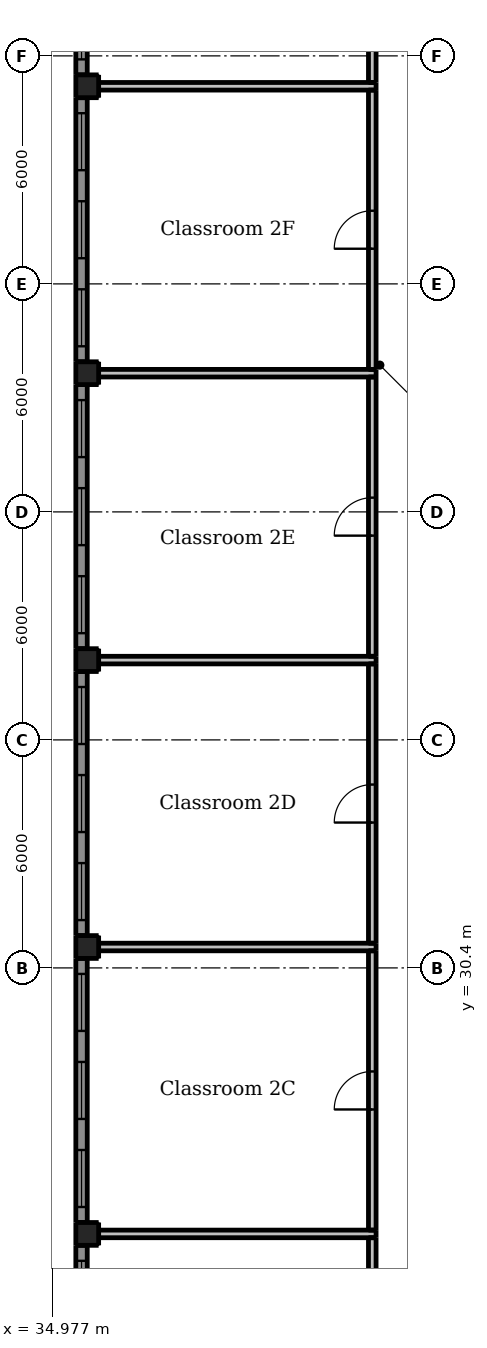
"""IFC4 building model, lengths in metres.
Left out: names, types, materials, properties, quantities, classifications, styles, units other than length and angle.
Written with IfcOpenShell. Run it as: python <this file> out.ifc"""

import sys

from ifc_helpers import new_model, si_unit, direction, frame, frame_2d, origin, origin_2d, place, context, subcontext, project, spatial, rectangle, extrude, element, fill, save


model = new_model("IFC4")
c1 = context("Model", 3, precision=1e-05, world=origin(), true_north=direction((0.0, 1.0)))
c2 = subcontext(c1, "Body", "Model", "MODEL_VIEW")
j1 = project(units=[si_unit("LENGTHUNIT", "METRE"), si_unit("PLANEANGLEUNIT", "RADIAN")], contexts=[c1])
p1 = place(None, origin())
s1 = spatial("IfcSite", under=j1, at=p1, CompositionType="ELEMENT")
p2 = place(p1, origin())
s2 = spatial("IfcBuilding", under=s1, at=p2, CompositionType="ELEMENT")
p3 = place(p2, frame((0.0, 0.0, 10.0)))
s3 = spatial("IfcBuildingStorey", under=s2, at=p3, CompositionType="ELEMENT", Elevation=10.0)
for number, where, z_axis, x_axis in (
    (1, (35.9, 23.4, -0.3), (0.0, 0.0, 1.0), (1.0, 0.0, 0.0)),
    (2, (35.9, 30.95, -0.3), (0.0, 0.0, 1.0), (1.0, 0.0, 0.0)),
    (3, (35.9, 38.5, -0.3), (0.0, 0.0, 1.0), (1.0, 0.0, 0.0)),
    (4, (35.9, 46.05, -0.3), (0.0, 0.0, 1.0), (1.0, 0.0, 0.0)),
    (5, (35.9, 53.6, -0.3), (0.0, 0.0, 1.0), (1.0, 0.0, 0.0)),
):
    element("IfcColumn", number, at=place(p3, frame(where, z_axis=z_axis, x_axis=x_axis)), inside=s3, PredefinedType="COLUMN", context=c2, shape_type="SweptSolid", body=[
        extrude(rectangle(XDim=0.6, YDim=0.6, at=origin_2d()), origin(), (0.0, 0.0, 1.0), 4.5),
    ])
p4 = place(p3, frame((35.75, 16.15, 0.0), z_axis=(0.0, 0.0, 1.0), x_axis=(0.0, 1.0, 0.0)))
e6 = element("IfcWall", 6, at=p4, inside=s3, PredefinedType="SOLIDWALL", context=c2, shape_type="SweptSolid", body=[
    extrude(rectangle(XDim=6.95, YDim=0.3, at=frame_2d((3.475, 0.0))), origin(), (0.0, 0.0, 1.0), 3.3),
])
p5 = place(p4, frame((0.408, 0.0, 0.9)))
e7 = element("IfcOpeningElement", 7, at=p5, cuts=e6, PredefinedType="OPENING", context=c2, shape_type="SweptSolid", body=[
    extrude(rectangle(XDim=1.5, YDim=1.5, at=frame_2d((0.75, 0.75))), frame((0.0, 0.16, 0.0), z_axis=(0.0, -1.0, 0.0), x_axis=(1.0, 0.0, 0.0)), (0.0, 0.0, 1.0), 0.32),
])
p6 = place(p4, frame((2.725, 0.0, 0.9)))
e8 = element("IfcOpeningElement", 8, at=p6, cuts=e6, PredefinedType="OPENING", context=c2, shape_type="SweptSolid", body=[
    extrude(rectangle(XDim=1.5, YDim=1.5, at=frame_2d((0.75, 0.75))), frame((0.0, 0.16, 0.0), z_axis=(0.0, -1.0, 0.0), x_axis=(1.0, 0.0, 0.0)), (0.0, 0.0, 1.0), 0.32),
])
p7 = place(p4, frame((5.042, 0.0, 0.9)))
e9 = element("IfcOpeningElement", 9, at=p7, cuts=e6, PredefinedType="OPENING", context=c2, shape_type="SweptSolid", body=[
    extrude(rectangle(XDim=1.5, YDim=1.5, at=frame_2d((0.75, 0.75))), frame((0.0, 0.16, 0.0), z_axis=(0.0, -1.0, 0.0), x_axis=(1.0, 0.0, 0.0)), (0.0, 0.0, 1.0), 0.32),
])
p8 = place(p3, frame((35.75, 23.7, 0.0), z_axis=(0.0, 0.0, 1.0), x_axis=(0.0, 1.0, 0.0)))
e10 = element("IfcWall", 10, at=p8, inside=s3, PredefinedType="SOLIDWALL", context=c2, shape_type="SweptSolid", body=[
    extrude(rectangle(XDim=6.95, YDim=0.3, at=frame_2d((3.475, 0.0))), origin(), (0.0, 0.0, 1.0), 3.3),
])
p9 = place(p8, frame((0.408, 0.0, 0.9)))
e11 = element("IfcOpeningElement", 11, at=p9, cuts=e10, PredefinedType="OPENING", context=c2, shape_type="SweptSolid", body=[
    extrude(rectangle(XDim=1.5, YDim=1.5, at=frame_2d((0.75, 0.75))), frame((0.0, 0.16, 0.0), z_axis=(0.0, -1.0, 0.0), x_axis=(1.0, 0.0, 0.0)), (0.0, 0.0, 1.0), 0.32),
])
p10 = place(p8, frame((2.725, 0.0, 0.9)))
e12 = element("IfcOpeningElement", 12, at=p10, cuts=e10, PredefinedType="OPENING", context=c2, shape_type="SweptSolid", body=[
    extrude(rectangle(XDim=1.5, YDim=1.5, at=frame_2d((0.75, 0.75))), frame((0.0, 0.16, 0.0), z_axis=(0.0, -1.0, 0.0), x_axis=(1.0, 0.0, 0.0)), (0.0, 0.0, 1.0), 0.32),
])
p11 = place(p8, frame((5.042, 0.0, 0.9)))
e13 = element("IfcOpeningElement", 13, at=p11, cuts=e10, PredefinedType="OPENING", context=c2, shape_type="SweptSolid", body=[
    extrude(rectangle(XDim=1.5, YDim=1.5, at=frame_2d((0.75, 0.75))), frame((0.0, 0.16, 0.0), z_axis=(0.0, -1.0, 0.0), x_axis=(1.0, 0.0, 0.0)), (0.0, 0.0, 1.0), 0.32),
])
p12 = place(p3, frame((35.75, 31.25, 0.0), z_axis=(0.0, 0.0, 1.0), x_axis=(0.0, 1.0, 0.0)))
e14 = element("IfcWall", 14, at=p12, inside=s3, PredefinedType="SOLIDWALL", context=c2, shape_type="SweptSolid", body=[
    extrude(rectangle(XDim=6.95, YDim=0.3, at=frame_2d((3.475, 0.0))), origin(), (0.0, 0.0, 1.0), 3.3),
])
p13 = place(p12, frame((0.408, 0.0, 0.9)))
e15 = element("IfcOpeningElement", 15, at=p13, cuts=e14, PredefinedType="OPENING", context=c2, shape_type="SweptSolid", body=[
    extrude(rectangle(XDim=1.5, YDim=1.5, at=frame_2d((0.75, 0.75))), frame((0.0, 0.16, 0.0), z_axis=(0.0, -1.0, 0.0), x_axis=(1.0, 0.0, 0.0)), (0.0, 0.0, 1.0), 0.32),
])
p14 = place(p12, frame((2.725, 0.0, 0.9)))
e16 = element("IfcOpeningElement", 16, at=p14, cuts=e14, PredefinedType="OPENING", context=c2, shape_type="SweptSolid", body=[
    extrude(rectangle(XDim=1.5, YDim=1.5, at=frame_2d((0.75, 0.75))), frame((0.0, 0.16, 0.0), z_axis=(0.0, -1.0, 0.0), x_axis=(1.0, 0.0, 0.0)), (0.0, 0.0, 1.0), 0.32),
])
p15 = place(p12, frame((5.042, 0.0, 0.9)))
e17 = element("IfcOpeningElement", 17, at=p15, cuts=e14, PredefinedType="OPENING", context=c2, shape_type="SweptSolid", body=[
    extrude(rectangle(XDim=1.5, YDim=1.5, at=frame_2d((0.75, 0.75))), frame((0.0, 0.16, 0.0), z_axis=(0.0, -1.0, 0.0), x_axis=(1.0, 0.0, 0.0)), (0.0, 0.0, 1.0), 0.32),
])
p16 = place(p3, frame((35.75, 38.8, 0.0), z_axis=(0.0, 0.0, 1.0), x_axis=(0.0, 1.0, 0.0)))
e18 = element("IfcWall", 18, at=p16, inside=s3, PredefinedType="SOLIDWALL", context=c2, shape_type="SweptSolid", body=[
    extrude(rectangle(XDim=6.95, YDim=0.3, at=frame_2d((3.475, 0.0))), origin(), (0.0, 0.0, 1.0), 3.3),
])
p17 = place(p16, frame((0.408, 0.0, 0.9)))
e19 = element("IfcOpeningElement", 19, at=p17, cuts=e18, PredefinedType="OPENING", context=c2, shape_type="SweptSolid", body=[
    extrude(rectangle(XDim=1.5, YDim=1.5, at=frame_2d((0.75, 0.75))), frame((0.0, 0.16, 0.0), z_axis=(0.0, -1.0, 0.0), x_axis=(1.0, 0.0, 0.0)), (0.0, 0.0, 1.0), 0.32),
])
p18 = place(p16, frame((2.725, 0.0, 0.9)))
e20 = element("IfcOpeningElement", 20, at=p18, cuts=e18, PredefinedType="OPENING", context=c2, shape_type="SweptSolid", body=[
    extrude(rectangle(XDim=1.5, YDim=1.5, at=frame_2d((0.75, 0.75))), frame((0.0, 0.16, 0.0), z_axis=(0.0, -1.0, 0.0), x_axis=(1.0, 0.0, 0.0)), (0.0, 0.0, 1.0), 0.32),
])
p19 = place(p16, frame((5.042, 0.0, 0.9)))
e21 = element("IfcOpeningElement", 21, at=p19, cuts=e18, PredefinedType="OPENING", context=c2, shape_type="SweptSolid", body=[
    extrude(rectangle(XDim=1.5, YDim=1.5, at=frame_2d((0.75, 0.75))), frame((0.0, 0.16, 0.0), z_axis=(0.0, -1.0, 0.0), x_axis=(1.0, 0.0, 0.0)), (0.0, 0.0, 1.0), 0.32),
])
p20 = place(p3, frame((35.75, 46.35, 0.0), z_axis=(0.0, 0.0, 1.0), x_axis=(0.0, 1.0, 0.0)))
e22 = element("IfcWall", 22, at=p20, inside=s3, PredefinedType="SOLIDWALL", context=c2, shape_type="SweptSolid", body=[
    extrude(rectangle(XDim=6.95, YDim=0.3, at=frame_2d((3.475, 0.0))), origin(), (0.0, 0.0, 1.0), 3.3),
])
p21 = place(p20, frame((0.408, 0.0, 0.9)))
e23 = element("IfcOpeningElement", 23, at=p21, cuts=e22, PredefinedType="OPENING", context=c2, shape_type="SweptSolid", body=[
    extrude(rectangle(XDim=1.5, YDim=1.5, at=frame_2d((0.75, 0.75))), frame((0.0, 0.16, 0.0), z_axis=(0.0, -1.0, 0.0), x_axis=(1.0, 0.0, 0.0)), (0.0, 0.0, 1.0), 0.32),
])
p22 = place(p20, frame((2.725, 0.0, 0.9)))
e24 = element("IfcOpeningElement", 24, at=p22, cuts=e22, PredefinedType="OPENING", context=c2, shape_type="SweptSolid", body=[
    extrude(rectangle(XDim=1.5, YDim=1.5, at=frame_2d((0.75, 0.75))), frame((0.0, 0.16, 0.0), z_axis=(0.0, -1.0, 0.0), x_axis=(1.0, 0.0, 0.0)), (0.0, 0.0, 1.0), 0.32),
])
p23 = place(p20, frame((5.042, 0.0, 0.9)))
e25 = element("IfcOpeningElement", 25, at=p23, cuts=e22, PredefinedType="OPENING", context=c2, shape_type="SweptSolid", body=[
    extrude(rectangle(XDim=1.5, YDim=1.5, at=frame_2d((0.75, 0.75))), frame((0.0, 0.16, 0.0), z_axis=(0.0, -1.0, 0.0), x_axis=(1.0, 0.0, 0.0)), (0.0, 0.0, 1.0), 0.32),
])
p24 = place(p3, frame((35.75, 53.9, 0.0), z_axis=(0.0, 0.0, 1.0), x_axis=(0.0, 1.0, 0.0)))
e26 = element("IfcWall", 26, at=p24, inside=s3, PredefinedType="SOLIDWALL", context=c2, shape_type="SweptSolid", body=[
    extrude(rectangle(XDim=6.95, YDim=0.3, at=frame_2d((3.475, 0.0))), origin(), (0.0, 0.0, 1.0), 3.3),
])
p25 = place(p24, frame((0.408, 0.0, 0.9)))
e27 = element("IfcOpeningElement", 27, at=p25, cuts=e26, PredefinedType="OPENING", context=c2, shape_type="SweptSolid", body=[
    extrude(rectangle(XDim=1.5, YDim=1.5, at=frame_2d((0.75, 0.75))), frame((0.0, 0.16, 0.0), z_axis=(0.0, -1.0, 0.0), x_axis=(1.0, 0.0, 0.0)), (0.0, 0.0, 1.0), 0.32),
])
p26 = place(p24, frame((2.725, 0.0, 0.9)))
e28 = element("IfcOpeningElement", 28, at=p26, cuts=e26, PredefinedType="OPENING", context=c2, shape_type="SweptSolid", body=[
    extrude(rectangle(XDim=1.5, YDim=1.5, at=frame_2d((0.75, 0.75))), frame((0.0, 0.16, 0.0), z_axis=(0.0, -1.0, 0.0), x_axis=(1.0, 0.0, 0.0)), (0.0, 0.0, 1.0), 0.32),
])
p27 = place(p24, frame((5.042, 0.0, 0.9)))
e29 = element("IfcOpeningElement", 29, at=p27, cuts=e26, PredefinedType="OPENING", context=c2, shape_type="SweptSolid", body=[
    extrude(rectangle(XDim=1.5, YDim=1.5, at=frame_2d((0.75, 0.75))), frame((0.0, 0.16, 0.0), z_axis=(0.0, -1.0, 0.0), x_axis=(1.0, 0.0, 0.0)), (0.0, 0.0, 1.0), 0.32),
])
p28 = place(p3, frame((43.4, 15.95, 0.0), z_axis=(0.0, 0.0, 1.0), x_axis=(0.0, 1.0, 0.0)))
e30 = element("IfcWall", 30, at=p28, inside=s3, PredefinedType="PARTITIONING", context=c2, shape_type="SweptSolid", body=[
    extrude(rectangle(XDim=7.35, YDim=0.2, at=frame_2d((3.675, 0.0))), origin(), (0.0, 0.0, 1.0), 3.1),
])
p29 = place(p28, frame((3.175, 0.0, 0.0)))
e31 = element("IfcOpeningElement", 31, at=p29, cuts=e30, PredefinedType="OPENING", context=c2, shape_type="SweptSolid", body=[
    extrude(rectangle(XDim=1.0, YDim=2.1, at=frame_2d((0.5, 1.05))), frame((0.0, 0.11, 0.0), z_axis=(0.0, -1.0, 0.0), x_axis=(1.0, 0.0, 0.0)), (0.0, 0.0, 1.0), 0.22),
])
p30 = place(p3, frame((43.4, 23.5, 0.0), z_axis=(0.0, 0.0, 1.0), x_axis=(0.0, 1.0, 0.0)))
e32 = element("IfcWall", 32, at=p30, inside=s3, PredefinedType="PARTITIONING", context=c2, shape_type="SweptSolid", body=[
    extrude(rectangle(XDim=7.35, YDim=0.2, at=frame_2d((3.675, 0.0))), origin(), (0.0, 0.0, 1.0), 3.1),
])
p31 = place(p30, frame((3.175, 0.0, 0.0)))
e33 = element("IfcOpeningElement", 33, at=p31, cuts=e32, PredefinedType="OPENING", context=c2, shape_type="SweptSolid", body=[
    extrude(rectangle(XDim=1.0, YDim=2.1, at=frame_2d((0.5, 1.05))), frame((0.0, 0.11, 0.0), z_axis=(0.0, -1.0, 0.0), x_axis=(1.0, 0.0, 0.0)), (0.0, 0.0, 1.0), 0.22),
])
p32 = place(p3, frame((43.4, 31.05, 0.0), z_axis=(0.0, 0.0, 1.0), x_axis=(0.0, 1.0, 0.0)))
e34 = element("IfcWall", 34, at=p32, inside=s3, PredefinedType="PARTITIONING", context=c2, shape_type="SweptSolid", body=[
    extrude(rectangle(XDim=7.35, YDim=0.2, at=frame_2d((3.675, 0.0))), origin(), (0.0, 0.0, 1.0), 3.1),
])
p33 = place(p32, frame((3.175, 0.0, 0.0)))
e35 = element("IfcOpeningElement", 35, at=p33, cuts=e34, PredefinedType="OPENING", context=c2, shape_type="SweptSolid", body=[
    extrude(rectangle(XDim=1.0, YDim=2.1, at=frame_2d((0.5, 1.05))), frame((0.0, 0.11, 0.0), z_axis=(0.0, -1.0, 0.0), x_axis=(1.0, 0.0, 0.0)), (0.0, 0.0, 1.0), 0.22),
])
p34 = place(p3, frame((43.4, 38.6, 0.0), z_axis=(0.0, 0.0, 1.0), x_axis=(0.0, 1.0, 0.0)))
e36 = element("IfcWall", 36, at=p34, inside=s3, PredefinedType="PARTITIONING", context=c2, shape_type="SweptSolid", body=[
    extrude(rectangle(XDim=7.35, YDim=0.2, at=frame_2d((3.675, 0.0))), origin(), (0.0, 0.0, 1.0), 3.1),
])
p35 = place(p34, frame((3.175, 0.0, 0.0)))
e37 = element("IfcOpeningElement", 37, at=p35, cuts=e36, PredefinedType="OPENING", context=c2, shape_type="SweptSolid", body=[
    extrude(rectangle(XDim=1.0, YDim=2.1, at=frame_2d((0.5, 1.05))), frame((0.0, 0.11, 0.0), z_axis=(0.0, -1.0, 0.0), x_axis=(1.0, 0.0, 0.0)), (0.0, 0.0, 1.0), 0.22),
])
p36 = place(p3, frame((43.4, 46.15, 0.0), z_axis=(0.0, 0.0, 1.0), x_axis=(0.0, 1.0, 0.0)))
e38 = element("IfcWall", 38, at=p36, inside=s3, PredefinedType="PARTITIONING", context=c2, shape_type="SweptSolid", body=[
    extrude(rectangle(XDim=7.35, YDim=0.2, at=frame_2d((3.675, 0.0))), origin(), (0.0, 0.0, 1.0), 3.1),
])
p37 = place(p36, frame((3.175, 0.0, 0.0)))
e39 = element("IfcOpeningElement", 39, at=p37, cuts=e38, PredefinedType="OPENING", context=c2, shape_type="SweptSolid", body=[
    extrude(rectangle(XDim=1.0, YDim=2.1, at=frame_2d((0.5, 1.05))), frame((0.0, 0.11, 0.0), z_axis=(0.0, -1.0, 0.0), x_axis=(1.0, 0.0, 0.0)), (0.0, 0.0, 1.0), 0.22),
])
p38 = place(p3, frame((43.4, 53.7, 0.0), z_axis=(0.0, 0.0, 1.0), x_axis=(0.0, 1.0, 0.0)))
e40 = element("IfcWall", 40, at=p38, inside=s3, PredefinedType="PARTITIONING", context=c2, shape_type="SweptSolid", body=[
    extrude(rectangle(XDim=7.35, YDim=0.2, at=frame_2d((3.675, 0.0))), origin(), (0.0, 0.0, 1.0), 3.1),
])
p39 = place(p38, frame((3.175, 0.0, 0.0)))
e41 = element("IfcOpeningElement", 41, at=p39, cuts=e40, PredefinedType="OPENING", context=c2, shape_type="SweptSolid", body=[
    extrude(rectangle(XDim=1.0, YDim=2.1, at=frame_2d((0.5, 1.05))), frame((0.0, 0.11, 0.0), z_axis=(0.0, -1.0, 0.0), x_axis=(1.0, 0.0, 0.0)), (0.0, 0.0, 1.0), 0.22),
])
for number, where, z_axis, x_axis in (
    (42, (36.2, 23.4, 0.0), (0.0, 0.0, 1.0), (1.0, 0.0, 0.0)),
    (43, (36.2, 30.95, 0.0), (0.0, 0.0, 1.0), (1.0, 0.0, 0.0)),
    (44, (36.2, 38.5, 0.0), (0.0, 0.0, 1.0), (1.0, 0.0, 0.0)),
    (45, (36.2, 46.05, 0.0), (0.0, 0.0, 1.0), (1.0, 0.0, 0.0)),
    (46, (36.2, 53.6, 0.0), (0.0, 0.0, 1.0), (1.0, 0.0, 0.0)),
):
    element("IfcWall", number, at=place(p3, frame(where, z_axis=z_axis, x_axis=x_axis)), inside=s3, PredefinedType="PARTITIONING", context=c2, shape_type="SweptSolid", body=[
        extrude(rectangle(XDim=7.3, YDim=0.2, at=frame_2d((3.65, 0.0))), origin(), (0.0, 0.0, 1.0), 3.1),
    ])
p40 = place(p7, origin())
e47 = element("IfcWindow", 47, at=p40, inside=s3, PartitioningType="DOUBLE_PANEL_HORIZONTAL", PredefinedType="WINDOW", context=c2, shape_type="SweptSolid", body=[
    extrude(rectangle(XDim=1.5, YDim=1.5, at=frame_2d((0.75, 0.75))), frame((0.0, 0.03, 0.0), z_axis=(0.0, -1.0, 0.0), x_axis=(1.0, 0.0, 0.0)), (0.0, 0.0, 1.0), 0.06),
])
fill(e9, e47)
p41 = place(p9, origin())
e48 = element("IfcWindow", 48, at=p41, inside=s3, PartitioningType="DOUBLE_PANEL_HORIZONTAL", PredefinedType="WINDOW", context=c2, shape_type="SweptSolid", body=[
    extrude(rectangle(XDim=1.5, YDim=1.5, at=frame_2d((0.75, 0.75))), frame((0.0, 0.03, 0.0), z_axis=(0.0, -1.0, 0.0), x_axis=(1.0, 0.0, 0.0)), (0.0, 0.0, 1.0), 0.06),
])
fill(e11, e48)
p42 = place(p10, origin())
e49 = element("IfcWindow", 49, at=p42, inside=s3, PartitioningType="DOUBLE_PANEL_HORIZONTAL", PredefinedType="WINDOW", context=c2, shape_type="SweptSolid", body=[
    extrude(rectangle(XDim=1.5, YDim=1.5, at=frame_2d((0.75, 0.75))), frame((0.0, 0.03, 0.0), z_axis=(0.0, -1.0, 0.0), x_axis=(1.0, 0.0, 0.0)), (0.0, 0.0, 1.0), 0.06),
])
fill(e12, e49)
p43 = place(p11, origin())
e50 = element("IfcWindow", 50, at=p43, inside=s3, PartitioningType="DOUBLE_PANEL_HORIZONTAL", PredefinedType="WINDOW", context=c2, shape_type="SweptSolid", body=[
    extrude(rectangle(XDim=1.5, YDim=1.5, at=frame_2d((0.75, 0.75))), frame((0.0, 0.03, 0.0), z_axis=(0.0, -1.0, 0.0), x_axis=(1.0, 0.0, 0.0)), (0.0, 0.0, 1.0), 0.06),
])
fill(e13, e50)
p44 = place(p13, origin())
e51 = element("IfcWindow", 51, at=p44, inside=s3, PartitioningType="DOUBLE_PANEL_HORIZONTAL", PredefinedType="WINDOW", context=c2, shape_type="SweptSolid", body=[
    extrude(rectangle(XDim=1.5, YDim=1.5, at=frame_2d((0.75, 0.75))), frame((0.0, 0.03, 0.0), z_axis=(0.0, -1.0, 0.0), x_axis=(1.0, 0.0, 0.0)), (0.0, 0.0, 1.0), 0.06),
])
fill(e15, e51)
p45 = place(p14, origin())
e52 = element("IfcWindow", 52, at=p45, inside=s3, PartitioningType="DOUBLE_PANEL_HORIZONTAL", PredefinedType="WINDOW", context=c2, shape_type="SweptSolid", body=[
    extrude(rectangle(XDim=1.5, YDim=1.5, at=frame_2d((0.75, 0.75))), frame((0.0, 0.03, 0.0), z_axis=(0.0, -1.0, 0.0), x_axis=(1.0, 0.0, 0.0)), (0.0, 0.0, 1.0), 0.06),
])
fill(e16, e52)
p46 = place(p15, origin())
e53 = element("IfcWindow", 53, at=p46, inside=s3, PartitioningType="DOUBLE_PANEL_HORIZONTAL", PredefinedType="WINDOW", context=c2, shape_type="SweptSolid", body=[
    extrude(rectangle(XDim=1.5, YDim=1.5, at=frame_2d((0.75, 0.75))), frame((0.0, 0.03, 0.0), z_axis=(0.0, -1.0, 0.0), x_axis=(1.0, 0.0, 0.0)), (0.0, 0.0, 1.0), 0.06),
])
fill(e17, e53)
p47 = place(p17, origin())
e54 = element("IfcWindow", 54, at=p47, inside=s3, PartitioningType="DOUBLE_PANEL_HORIZONTAL", PredefinedType="WINDOW", context=c2, shape_type="SweptSolid", body=[
    extrude(rectangle(XDim=1.5, YDim=1.5, at=frame_2d((0.75, 0.75))), frame((0.0, 0.03, 0.0), z_axis=(0.0, -1.0, 0.0), x_axis=(1.0, 0.0, 0.0)), (0.0, 0.0, 1.0), 0.06),
])
fill(e19, e54)
p48 = place(p18, origin())
e55 = element("IfcWindow", 55, at=p48, inside=s3, PartitioningType="DOUBLE_PANEL_HORIZONTAL", PredefinedType="WINDOW", context=c2, shape_type="SweptSolid", body=[
    extrude(rectangle(XDim=1.5, YDim=1.5, at=frame_2d((0.75, 0.75))), frame((0.0, 0.03, 0.0), z_axis=(0.0, -1.0, 0.0), x_axis=(1.0, 0.0, 0.0)), (0.0, 0.0, 1.0), 0.06),
])
fill(e20, e55)
p49 = place(p19, origin())
e56 = element("IfcWindow", 56, at=p49, inside=s3, PartitioningType="DOUBLE_PANEL_HORIZONTAL", PredefinedType="WINDOW", context=c2, shape_type="SweptSolid", body=[
    extrude(rectangle(XDim=1.5, YDim=1.5, at=frame_2d((0.75, 0.75))), frame((0.0, 0.03, 0.0), z_axis=(0.0, -1.0, 0.0), x_axis=(1.0, 0.0, 0.0)), (0.0, 0.0, 1.0), 0.06),
])
fill(e21, e56)
p50 = place(p21, origin())
e57 = element("IfcWindow", 57, at=p50, inside=s3, PartitioningType="DOUBLE_PANEL_HORIZONTAL", PredefinedType="WINDOW", context=c2, shape_type="SweptSolid", body=[
    extrude(rectangle(XDim=1.5, YDim=1.5, at=frame_2d((0.75, 0.75))), frame((0.0, 0.03, 0.0), z_axis=(0.0, -1.0, 0.0), x_axis=(1.0, 0.0, 0.0)), (0.0, 0.0, 1.0), 0.06),
])
fill(e23, e57)
p51 = place(p22, origin())
e58 = element("IfcWindow", 58, at=p51, inside=s3, PartitioningType="DOUBLE_PANEL_HORIZONTAL", PredefinedType="WINDOW", context=c2, shape_type="SweptSolid", body=[
    extrude(rectangle(XDim=1.5, YDim=1.5, at=frame_2d((0.75, 0.75))), frame((0.0, 0.03, 0.0), z_axis=(0.0, -1.0, 0.0), x_axis=(1.0, 0.0, 0.0)), (0.0, 0.0, 1.0), 0.06),
])
fill(e24, e58)
p52 = place(p23, origin())
e59 = element("IfcWindow", 59, at=p52, inside=s3, PartitioningType="DOUBLE_PANEL_HORIZONTAL", PredefinedType="WINDOW", context=c2, shape_type="SweptSolid", body=[
    extrude(rectangle(XDim=1.5, YDim=1.5, at=frame_2d((0.75, 0.75))), frame((0.0, 0.03, 0.0), z_axis=(0.0, -1.0, 0.0), x_axis=(1.0, 0.0, 0.0)), (0.0, 0.0, 1.0), 0.06),
])
fill(e25, e59)
p53 = place(p25, origin())
e60 = element("IfcWindow", 60, at=p53, inside=s3, PartitioningType="DOUBLE_PANEL_HORIZONTAL", PredefinedType="WINDOW", context=c2, shape_type="SweptSolid", body=[
    extrude(rectangle(XDim=1.5, YDim=1.5, at=frame_2d((0.75, 0.75))), frame((0.0, 0.03, 0.0), z_axis=(0.0, -1.0, 0.0), x_axis=(1.0, 0.0, 0.0)), (0.0, 0.0, 1.0), 0.06),
])
fill(e27, e60)
p54 = place(p31, origin())
e61 = element("IfcDoor", 61, at=p54, inside=s3, OperationType="SINGLE_SWING_LEFT", PredefinedType="DOOR", context=c2, shape_type="SweptSolid", body=[
    extrude(rectangle(XDim=1.0, YDim=2.1, at=frame_2d((0.5, 1.05))), frame((0.0, 0.025, 0.0), z_axis=(0.0, -1.0, 0.0), x_axis=(1.0, 0.0, 0.0)), (0.0, 0.0, 1.0), 0.05),
])
fill(e33, e61)
p55 = place(p33, origin())
e62 = element("IfcDoor", 62, at=p55, inside=s3, OperationType="SINGLE_SWING_LEFT", PredefinedType="DOOR", context=c2, shape_type="SweptSolid", body=[
    extrude(rectangle(XDim=1.0, YDim=2.1, at=frame_2d((0.5, 1.05))), frame((0.0, 0.025, 0.0), z_axis=(0.0, -1.0, 0.0), x_axis=(1.0, 0.0, 0.0)), (0.0, 0.0, 1.0), 0.05),
])
fill(e35, e62)
p56 = place(p35, origin())
e63 = element("IfcDoor", 63, at=p56, inside=s3, OperationType="SINGLE_SWING_LEFT", PredefinedType="DOOR", context=c2, shape_type="SweptSolid", body=[
    extrude(rectangle(XDim=1.0, YDim=2.1, at=frame_2d((0.5, 1.05))), frame((0.0, 0.025, 0.0), z_axis=(0.0, -1.0, 0.0), x_axis=(1.0, 0.0, 0.0)), (0.0, 0.0, 1.0), 0.05),
])
fill(e37, e63)
p57 = place(p37, origin())
e64 = element("IfcDoor", 64, at=p57, inside=s3, OperationType="SINGLE_SWING_LEFT", PredefinedType="DOOR", context=c2, shape_type="SweptSolid", body=[
    extrude(rectangle(XDim=1.0, YDim=2.1, at=frame_2d((0.5, 1.05))), frame((0.0, 0.025, 0.0), z_axis=(0.0, -1.0, 0.0), x_axis=(1.0, 0.0, 0.0)), (0.0, 0.0, 1.0), 0.05),
])
fill(e39, e64)
save(model, sys.argv[1])
